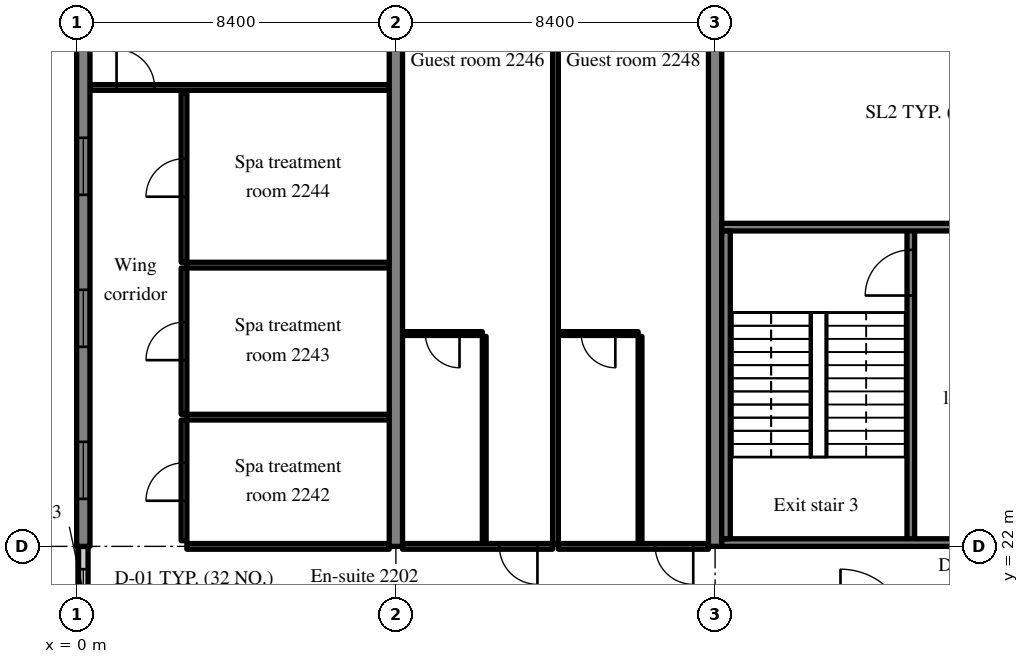
"""IFC4 building model, lengths in metres.
Left out: names, types, materials, properties, quantities, classifications, styles, units other than length and angle.
Written with IfcOpenShell. Run it as: python <this file> out.ifc"""

import sys

from ifc_helpers import new_model, si_unit, direction, frame, frame_2d, origin, place, context, subcontext, project, spatial, rectangle, extrude, source, transform, mapped, element, fill, save


model = new_model("IFC4")
c1 = context("Model", 3, precision=1e-05, world=origin(), true_north=direction((0.0, 1.0)))
c2 = subcontext(c1, "Body", "Model", "MODEL_VIEW")
j1 = project(units=[si_unit("LENGTHUNIT", "METRE"), si_unit("PLANEANGLEUNIT", "RADIAN")], contexts=[c1])
p1 = place(None, origin())
s1 = spatial("IfcSite", under=j1, at=p1, CompositionType="ELEMENT")
p2 = place(p1, origin())
s2 = spatial("IfcBuilding", under=s1, at=p2, CompositionType="ELEMENT")
p3 = place(p2, frame((0.0, 0.0, 95.2)))
s3 = spatial("IfcBuildingStorey", under=s2, at=p3, CompositionType="ELEMENT", Elevation=95.2)
m1 = source(origin(), c2, "Body", "SweptSolid", [
    extrude(rectangle(XDim=16.0, YDim=0.35, at=frame_2d((8.0, 0.0))), origin(), (0.0, 0.0, 1.0), 3.52),
])
p4 = place(p3, frame((0.175, 22.0, 0.0), z_axis=(0.0, 0.0, 1.0), x_axis=(0.0, 1.0, 0.0)))
e1 = element("IfcWall", 1, at=p4, inside=s3, PredefinedType="SHEAR", context=c2, shape_type="MappedRepresentation", body=[
    mapped(m1, transform((0.0, 0.0, 0.0), scale=1.0)),
])
m2 = source(origin(), c2, "Body", "SweptSolid", [
    extrude(rectangle(XDim=1.5, YDim=1.5, at=frame_2d((0.75, 0.75))), frame((0.0, 0.185, 0.0), z_axis=(0.0, -1.0, 0.0), x_axis=(1.0, 0.0, 0.0)), (0.0, 0.0, 1.0), 0.37),
])
p5 = place(p4, frame((1.25, 0.0, 0.9)))
e2 = element("IfcOpeningElement", 2, at=p5, cuts=e1, PredefinedType="OPENING", context=c2, shape_type="MappedRepresentation", body=[
    mapped(m2, transform((0.0, 0.0, 0.0), scale=1.0)),
])
p6 = place(p4, frame((5.25, 0.0, 0.9)))
e3 = element("IfcOpeningElement", 3, at=p6, cuts=e1, PredefinedType="OPENING", context=c2, shape_type="MappedRepresentation", body=[
    mapped(m2, transform((0.0, 0.0, 0.0), scale=1.0)),
])
p7 = place(p4, frame((9.25, 0.0, 0.9)))
e4 = element("IfcOpeningElement", 4, at=p7, cuts=e1, PredefinedType="OPENING", context=c2, shape_type="MappedRepresentation", body=[
    mapped(m2, transform((0.0, 0.0, 0.0), scale=1.0)),
])
p8 = place(p4, frame((13.25, 0.0, 0.9)))
e5 = element("IfcOpeningElement", 5, at=p8, cuts=e1, PredefinedType="OPENING", context=c2, shape_type="MappedRepresentation", body=[
    mapped(m2, transform((0.0, 0.0, 0.0), scale=1.0)),
])
m3 = source(origin(), c2, "Body", "SweptSolid", [
    extrude(rectangle(XDim=20.0, YDim=0.35, at=frame_2d((10.0, 0.0))), origin(), (0.0, 0.0, 1.0), 3.52),
])
for number, where, z_axis, x_axis in (
    (6, (8.4, 22.0, 0.0), (0.0, 0.0, 1.0), (0.0, 1.0, 0.0)),
    (7, (16.8, 22.0, 0.0), (0.0, 0.0, 1.0), (0.0, 1.0, 0.0)),
):
    element("IfcWall", number, at=place(p3, frame(where, z_axis=z_axis, x_axis=x_axis)), inside=s3, PredefinedType="SHEAR", context=c2, shape_type="MappedRepresentation", body=[
        mapped(m3, transform((0.0, 0.0, 0.0), scale=1.0)),
    ])
m4 = source(origin(), c2, "Body", "SweptSolid", [
    extrude(rectangle(XDim=2.4, YDim=0.25, at=frame_2d((1.2, 0.0))), origin(), (0.0, 0.0, 1.0), 2.62),
])
p9 = place(p3, frame((0.175, 19.6, 0.0), z_axis=(0.0, 0.0, 1.0), x_axis=(0.0, 1.0, 0.0)))
e8 = element("IfcWall", 8, at=p9, inside=s3, PredefinedType="SOLIDWALL", context=c2, shape_type="MappedRepresentation", body=[
    mapped(m4, transform((0.0, 0.0, 0.0), scale=1.0)),
])
m5 = source(origin(), c2, "Body", "SweptSolid", [
    extrude(rectangle(XDim=1.2, YDim=1.5, at=frame_2d((0.6, 0.75))), frame((0.0, 0.135, 0.0), z_axis=(0.0, -1.0, 0.0), x_axis=(1.0, 0.0, 0.0)), (0.0, 0.0, 1.0), 0.27),
])
p10 = place(p9, frame((0.6, 0.0, 0.9)))
e9 = element("IfcOpeningElement", 9, at=p10, cuts=e8, PredefinedType="OPENING", context=c2, shape_type="MappedRepresentation", body=[
    mapped(m5, transform((0.0, 0.0, 0.0), scale=1.0)),
])
m6 = source(origin(), c2, "Body", "SweptSolid", [
    extrude(rectangle(XDim=8.3, YDim=0.2, at=frame_2d((4.15, 0.0))), origin(), (0.0, 0.0, 1.0), 3.52),
])
p11 = place(p3, frame((21.95, 22.1, 0.0), z_axis=(0.0, 0.0, 1.0), x_axis=(0.0, 1.0, 0.0)))
e10 = element("IfcWall", 10, at=p11, inside=s3, PredefinedType="SOLIDWALL", context=c2, shape_type="MappedRepresentation", body=[
    mapped(m6, transform((0.0, 0.0, 0.0), scale=1.0)),
])
m7 = source(origin(), c2, "Body", "SweptSolid", [
    extrude(rectangle(XDim=1.2, YDim=2.1, at=frame_2d((0.6, 1.05))), frame((0.0, 0.11, 0.0), z_axis=(0.0, -1.0, 0.0), x_axis=(1.0, 0.0, 0.0)), (0.0, 0.0, 1.0), 0.22),
])
p12 = place(p11, frame((6.5, 0.0, 0.0)))
e11 = element("IfcOpeningElement", 11, at=p12, cuts=e10, PredefinedType="OPENING", context=c2, shape_type="MappedRepresentation", body=[
    mapped(m7, transform((0.0, 0.0, 0.0), scale=1.0)),
])
m8 = source(origin(), c2, "Body", "SweptSolid", [
    extrude(rectangle(XDim=8.225, YDim=0.2, at=frame_2d((4.112, 0.0))), origin(), (0.0, 0.0, 1.0), 3.52),
])
p13 = place(p3, frame((16.975, 22.1, 0.0), z_axis=(0.0, 0.0, 1.0), x_axis=(1.0, 0.0, 0.0)))
e12 = element("IfcWall", 12, at=p13, inside=s3, PredefinedType="SOLIDWALL", context=c2, shape_type="MappedRepresentation", body=[
    mapped(m8, transform((0.0, 0.0, 0.0), scale=1.0)),
])
p14 = place(p13, frame((6.025, 0.0, 0.0)))
e13 = element("IfcOpeningElement", 13, at=p14, cuts=e12, PredefinedType="OPENING", context=c2, shape_type="MappedRepresentation", body=[
    mapped(m7, transform((0.0, 0.0, 0.0), scale=1.0)),
])
p15 = place(p3, frame((16.975, 30.4, 0.0), z_axis=(0.0, 0.0, 1.0), x_axis=(1.0, 0.0, 0.0)))
e14 = element("IfcWall", 14, at=p15, inside=s3, PredefinedType="SOLIDWALL", context=c2, shape_type="MappedRepresentation", body=[
    mapped(m8, transform((0.0, 0.0, 0.0), scale=1.0)),
])
m9 = source(origin(), c2, "Body", "SweptSolid", [
    extrude(rectangle(XDim=1.0, YDim=2.1, at=frame_2d((0.5, 1.05))), frame((0.0, 0.11, 0.0), z_axis=(0.0, -1.0, 0.0), x_axis=(1.0, 0.0, 0.0)), (0.0, 0.0, 1.0), 0.22),
])
p16 = place(p15, frame((6.125, 0.0, 0.0)))
e15 = element("IfcOpeningElement", 15, at=p16, cuts=e14, PredefinedType="OPENING", context=c2, shape_type="MappedRepresentation", body=[
    mapped(m9, transform((0.0, 0.0, 0.0), scale=1.0)),
])
m10 = source(origin(), c2, "Body", "SweptSolid", [
    extrude(rectangle(XDim=8.1, YDim=0.225, at=frame_2d((4.05, 0.0))), origin(), (0.0, 0.0, 1.0), 3.52),
])
p17 = place(p3, frame((17.087, 22.2, 0.0), z_axis=(0.0, 0.0, 1.0), x_axis=(0.0, 1.0, 0.0)))
e16 = element("IfcWall", 16, at=p17, inside=s3, PredefinedType="SOLIDWALL", context=c2, shape_type="MappedRepresentation", body=[
    mapped(m10, transform((0.0, 0.0, 0.0), scale=1.0)),
])
m11 = source(origin(), c2, "Body", "SweptSolid", [
    extrude(rectangle(XDim=5.325, YDim=0.15, at=frame_2d((2.663, 0.0))), origin(), (0.0, 0.0, 1.0), 2.82),
])
p18 = place(p3, frame((2.9, 22.0, 0.0), z_axis=(0.0, 0.0, 1.0), x_axis=(1.0, 0.0, 0.0)))
e17 = element("IfcWall", 17, at=p18, inside=s3, PredefinedType="PARTITIONING", context=c2, shape_type="MappedRepresentation", body=[
    mapped(m11, transform((0.0, 0.0, 0.0), scale=1.0)),
])
m12 = source(origin(), c2, "Body", "SweptSolid", [
    extrude(rectangle(XDim=3.175, YDim=0.15, at=frame_2d((1.587, 0.0))), origin(), (0.0, 0.0, 1.0), 3.52),
])
p19 = place(p3, frame((2.825, 22.15, 0.0), z_axis=(0.0, 0.0, 1.0), x_axis=(0.0, 1.0, 0.0)))
e18 = element("IfcWall", 18, at=p19, inside=s3, PredefinedType="PARTITIONING", context=c2, shape_type="MappedRepresentation", body=[
    mapped(m12, transform((0.0, 0.0, 0.0), scale=1.0)),
])
m13 = source(origin(), c2, "Body", "SweptSolid", [
    extrude(rectangle(XDim=1.0, YDim=2.1, at=frame_2d((0.5, 1.05))), frame((0.0, 0.085, 0.0), z_axis=(0.0, -1.0, 0.0), x_axis=(1.0, 0.0, 0.0)), (0.0, 0.0, 1.0), 0.17),
])
p20 = place(p19, frame((1.05, 0.0, 0.0)))
e19 = element("IfcOpeningElement", 19, at=p20, cuts=e18, PredefinedType="OPENING", context=c2, shape_type="MappedRepresentation", body=[
    mapped(m13, transform((0.0, 0.0, 0.0), scale=1.0)),
])
m14 = source(origin(), c2, "Body", "SweptSolid", [
    extrude(rectangle(XDim=5.325, YDim=0.15, at=frame_2d((2.663, 0.0))), origin(), (0.0, 0.0, 1.0), 3.52),
])
p21 = place(p3, frame((2.9, 25.4, 0.0), z_axis=(0.0, 0.0, 1.0), x_axis=(1.0, 0.0, 0.0)))
e20 = element("IfcWall", 20, at=p21, inside=s3, PredefinedType="PARTITIONING", context=c2, shape_type="MappedRepresentation", body=[
    mapped(m14, transform((0.0, 0.0, 0.0), scale=1.0)),
])
m15 = source(origin(), c2, "Body", "SweptSolid", [
    extrude(rectangle(XDim=3.85, YDim=0.15, at=frame_2d((1.925, 0.0))), origin(), (0.0, 0.0, 1.0), 3.52),
])
p22 = place(p3, frame((2.825, 25.475, 0.0), z_axis=(0.0, 0.0, 1.0), x_axis=(0.0, 1.0, 0.0)))
e21 = element("IfcWall", 21, at=p22, inside=s3, PredefinedType="PARTITIONING", context=c2, shape_type="MappedRepresentation", body=[
    mapped(m15, transform((0.0, 0.0, 0.0), scale=1.0)),
])
p23 = place(p22, frame((1.425, 0.0, 0.0)))
e22 = element("IfcOpeningElement", 22, at=p23, cuts=e21, PredefinedType="OPENING", context=c2, shape_type="MappedRepresentation", body=[
    mapped(m13, transform((0.0, 0.0, 0.0), scale=1.0)),
])
p24 = place(p3, frame((2.9, 29.4, 0.0), z_axis=(0.0, 0.0, 1.0), x_axis=(1.0, 0.0, 0.0)))
e23 = element("IfcWall", 23, at=p24, inside=s3, PredefinedType="PARTITIONING", context=c2, shape_type="MappedRepresentation", body=[
    mapped(m14, transform((0.0, 0.0, 0.0), scale=1.0)),
])
m16 = source(origin(), c2, "Body", "SweptSolid", [
    extrude(rectangle(XDim=4.45, YDim=0.15, at=frame_2d((2.225, 0.0))), origin(), (0.0, 0.0, 1.0), 3.52),
])
p25 = place(p3, frame((2.825, 29.475, 0.0), z_axis=(0.0, 0.0, 1.0), x_axis=(0.0, 1.0, 0.0)))
e24 = element("IfcWall", 24, at=p25, inside=s3, PredefinedType="PARTITIONING", context=c2, shape_type="MappedRepresentation", body=[
    mapped(m16, transform((0.0, 0.0, 0.0), scale=1.0)),
])
p26 = place(p25, frame((1.725, 0.0, 0.0)))
e25 = element("IfcOpeningElement", 25, at=p26, cuts=e24, PredefinedType="OPENING", context=c2, shape_type="MappedRepresentation", body=[
    mapped(m13, transform((0.0, 0.0, 0.0), scale=1.0)),
])
m17 = source(origin(), c2, "Body", "SweptSolid", [
    extrude(rectangle(XDim=7.875, YDim=0.15, at=frame_2d((3.938, 0.0))), origin(), (0.0, 0.0, 1.0), 3.52),
])
p27 = place(p3, frame((0.35, 34.075, 0.0), z_axis=(0.0, 0.0, 1.0), x_axis=(1.0, 0.0, 0.0)))
e26 = element("IfcWall", 26, at=p27, inside=s3, PredefinedType="PARTITIONING", context=c2, shape_type="MappedRepresentation", body=[
    mapped(m17, transform((0.0, 0.0, 0.0), scale=1.0)),
])
p28 = place(p27, frame((0.7, 0.0, 0.0)))
e27 = element("IfcOpeningElement", 27, at=p28, cuts=e26, PredefinedType="OPENING", context=c2, shape_type="MappedRepresentation", body=[
    mapped(m13, transform((0.0, 0.0, 0.0), scale=1.0)),
])
m18 = source(origin(), c2, "Body", "SweptSolid", [
    extrude(rectangle(XDim=5.45, YDim=0.1, at=frame_2d((2.725, 0.0))), origin(), (0.0, 0.0, 1.0), 3.52),
])
p29 = place(p3, frame((10.725, 22.075, 0.0), z_axis=(0.0, 0.0, 1.0), x_axis=(0.0, 1.0, 0.0)))
e28 = element("IfcWall", 28, at=p29, inside=s3, PredefinedType="PARTITIONING", context=c2, shape_type="MappedRepresentation", body=[
    mapped(m18, transform((0.0, 0.0, 0.0), scale=1.0)),
])
m19 = source(origin(), c2, "Body", "SweptSolid", [
    extrude(rectangle(XDim=2.1, YDim=0.1, at=frame_2d((1.05, 0.0))), origin(), (0.0, 0.0, 1.0), 3.52),
])
p30 = place(p3, frame((8.575, 27.6, 0.0), z_axis=(0.0, 0.0, 1.0), x_axis=(1.0, 0.0, 0.0)))
e29 = element("IfcWall", 29, at=p30, inside=s3, PredefinedType="PARTITIONING", context=c2, shape_type="MappedRepresentation", body=[
    mapped(m19, transform((0.0, 0.0, 0.0), scale=1.0)),
])
m20 = source(origin(), c2, "Body", "SweptSolid", [
    extrude(rectangle(XDim=0.9, YDim=2.1, at=frame_2d((0.45, 1.05))), frame((0.0, 0.06, 0.0), z_axis=(0.0, -1.0, 0.0), x_axis=(1.0, 0.0, 0.0)), (0.0, 0.0, 1.0), 0.12),
])
p31 = place(p30, frame((0.6, 0.0, 0.0)))
e30 = element("IfcOpeningElement", 30, at=p31, cuts=e29, PredefinedType="OPENING", context=c2, shape_type="MappedRepresentation", body=[
    mapped(m20, transform((0.0, 0.0, 0.0), scale=1.0)),
])
m21 = source(origin(), c2, "Body", "SweptSolid", [
    extrude(rectangle(XDim=3.95, YDim=0.15, at=frame_2d((1.975, 0.0))), origin(), (0.0, 0.0, 1.0), 2.82),
])
p32 = place(p3, frame((8.575, 22.0, 0.0), z_axis=(0.0, 0.0, 1.0), x_axis=(1.0, 0.0, 0.0)))
e31 = element("IfcWall", 31, at=p32, inside=s3, PredefinedType="PARTITIONING", context=c2, shape_type="MappedRepresentation", body=[
    mapped(m21, transform((0.0, 0.0, 0.0), scale=1.0)),
])
p33 = place(p32, frame((2.55, 0.0, 0.0)))
e32 = element("IfcOpeningElement", 32, at=p33, cuts=e31, PredefinedType="OPENING", context=c2, shape_type="MappedRepresentation", body=[
    mapped(m13, transform((0.0, 0.0, 0.0), scale=1.0)),
])
p34 = place(p3, frame((14.825, 22.075, 0.0), z_axis=(0.0, 0.0, 1.0), x_axis=(0.0, 1.0, 0.0)))
e33 = element("IfcWall", 33, at=p34, inside=s3, PredefinedType="PARTITIONING", context=c2, shape_type="MappedRepresentation", body=[
    mapped(m18, transform((0.0, 0.0, 0.0), scale=1.0)),
])
m22 = source(origin(), c2, "Body", "SweptSolid", [
    extrude(rectangle(XDim=2.1, YDim=0.1, at=frame_2d((1.05, 0.0))), origin(), (0.0, 0.0, 1.0), 3.52),
])
p35 = place(p3, frame((12.675, 27.6, 0.0), z_axis=(0.0, 0.0, 1.0), x_axis=(1.0, 0.0, 0.0)))
e34 = element("IfcWall", 34, at=p35, inside=s3, PredefinedType="PARTITIONING", context=c2, shape_type="MappedRepresentation", body=[
    mapped(m22, transform((0.0, 0.0, 0.0), scale=1.0)),
])
p36 = place(p35, frame((0.6, 0.0, 0.0)))
e35 = element("IfcOpeningElement", 35, at=p36, cuts=e34, PredefinedType="OPENING", context=c2, shape_type="MappedRepresentation", body=[
    mapped(m20, transform((0.0, 0.0, 0.0), scale=1.0)),
])
p37 = place(p3, frame((12.675, 22.0, 0.0), z_axis=(0.0, 0.0, 1.0), x_axis=(1.0, 0.0, 0.0)))
e36 = element("IfcWall", 36, at=p37, inside=s3, PredefinedType="PARTITIONING", context=c2, shape_type="MappedRepresentation", body=[
    mapped(m21, transform((0.0, 0.0, 0.0), scale=1.0)),
])
p38 = place(p37, frame((2.55, 0.0, 0.0)))
e37 = element("IfcOpeningElement", 37, at=p38, cuts=e36, PredefinedType="OPENING", context=c2, shape_type="MappedRepresentation", body=[
    mapped(m13, transform((0.0, 0.0, 0.0), scale=1.0)),
])
m23 = source(origin(), c2, "Body", "SweptSolid", [
    extrude(rectangle(XDim=19.225, YDim=0.15, at=frame_2d((9.613, 0.0))), origin(), (0.0, 0.0, 1.0), 3.52),
])
p39 = place(p3, frame((12.6, 22.075, 0.0), z_axis=(0.0, 0.0, 1.0), x_axis=(0.0, 1.0, 0.0)))
e38 = element("IfcWall", 38, at=p39, inside=s3, PredefinedType="PARTITIONING", context=c2, shape_type="MappedRepresentation", body=[
    mapped(m23, transform((0.0, 0.0, 0.0), scale=1.0)),
])
m24 = source(origin(), c2, "Body", "SweptSolid", [
    extrude(rectangle(XDim=1.5, YDim=1.5, at=frame_2d((0.75, 0.75))), frame((0.0, 0.03, 0.0), z_axis=(0.0, -1.0, 0.0), x_axis=(1.0, 0.0, 0.0)), (0.0, 0.0, 1.0), 0.06),
])
p40 = place(p5, origin())
e39 = element("IfcWindow", 39, at=p40, inside=s3, PartitioningType="SINGLE_PANEL", PredefinedType="WINDOW", context=c2, shape_type="MappedRepresentation", body=[
    mapped(m24, transform((0.0, 0.0, 0.0), scale=1.0)),
])
fill(e2, e39)
p41 = place(p6, origin())
e40 = element("IfcWindow", 40, at=p41, inside=s3, PartitioningType="SINGLE_PANEL", PredefinedType="WINDOW", context=c2, shape_type="MappedRepresentation", body=[
    mapped(m24, transform((0.0, 0.0, 0.0), scale=1.0)),
])
fill(e3, e40)
p42 = place(p7, origin())
e41 = element("IfcWindow", 41, at=p42, inside=s3, PartitioningType="SINGLE_PANEL", PredefinedType="WINDOW", context=c2, shape_type="MappedRepresentation", body=[
    mapped(m24, transform((0.0, 0.0, 0.0), scale=1.0)),
])
fill(e4, e41)
m25 = source(origin(), c2, "Body", "SweptSolid", [
    extrude(rectangle(XDim=1.2, YDim=1.5, at=frame_2d((0.6, 0.75))), frame((0.0, 0.03, 0.0), z_axis=(0.0, -1.0, 0.0), x_axis=(1.0, 0.0, 0.0)), (0.0, 0.0, 1.0), 0.06),
])
p43 = place(p10, origin())
e42 = element("IfcWindow", 42, at=p43, inside=s3, PartitioningType="SINGLE_PANEL", PredefinedType="WINDOW", context=c2, shape_type="MappedRepresentation", body=[
    mapped(m25, transform((0.0, 0.0, 0.0), scale=1.0)),
])
fill(e9, e42)
m26 = source(origin(), c2, "Body", "SweptSolid", [
    extrude(rectangle(XDim=1.2, YDim=2.1, at=frame_2d((0.6, 1.05))), frame((0.0, 0.025, 0.0), z_axis=(0.0, -1.0, 0.0), x_axis=(1.0, 0.0, 0.0)), (0.0, 0.0, 1.0), 0.05),
])
p44 = place(p12, origin())
e43 = element("IfcDoor", 43, at=p44, inside=s3, OperationType="SINGLE_SWING_LEFT", PredefinedType="DOOR", context=c2, shape_type="MappedRepresentation", body=[
    mapped(m26, transform((0.0, 0.0, 0.0), scale=1.0)),
])
fill(e11, e43)
m27 = source(origin(), c2, "Body", "SweptSolid", [
    extrude(rectangle(XDim=1.0, YDim=2.1, at=frame_2d((0.5, 1.05))), frame((0.0, 0.025, 0.0), z_axis=(0.0, -1.0, 0.0), x_axis=(1.0, 0.0, 0.0)), (0.0, 0.0, 1.0), 0.05),
])
p45 = place(p20, origin())
e44 = element("IfcDoor", 44, at=p45, inside=s3, OperationType="SINGLE_SWING_LEFT", PredefinedType="DOOR", context=c2, shape_type="MappedRepresentation", body=[
    mapped(m27, transform((0.0, 0.0, 0.0), scale=1.0)),
])
fill(e19, e44)
p46 = place(p23, origin())
e45 = element("IfcDoor", 45, at=p46, inside=s3, OperationType="SINGLE_SWING_LEFT", PredefinedType="DOOR", context=c2, shape_type="MappedRepresentation", body=[
    mapped(m27, transform((0.0, 0.0, 0.0), scale=1.0)),
])
fill(e22, e45)
p47 = place(p26, origin())
e46 = element("IfcDoor", 46, at=p47, inside=s3, OperationType="SINGLE_SWING_LEFT", PredefinedType="DOOR", context=c2, shape_type="MappedRepresentation", body=[
    mapped(m27, transform((0.0, 0.0, 0.0), scale=1.0)),
])
fill(e25, e46)
p48 = place(p28, origin())
e47 = element("IfcDoor", 47, at=p48, inside=s3, OperationType="SINGLE_SWING_LEFT", PredefinedType="DOOR", context=c2, shape_type="MappedRepresentation", body=[
    mapped(m27, transform((0.0, 0.0, 0.0), scale=1.0)),
])
fill(e27, e47)
m28 = source(origin(), c2, "Body", "SweptSolid", [
    extrude(rectangle(XDim=0.9, YDim=2.1, at=frame_2d((0.45, 1.05))), frame((0.0, 0.025, 0.0), z_axis=(0.0, -1.0, 0.0), x_axis=(1.0, 0.0, 0.0)), (0.0, 0.0, 1.0), 0.05),
])
p49 = place(p31, origin())
e48 = element("IfcDoor", 48, at=p49, inside=s3, OperationType="SINGLE_SWING_RIGHT", PredefinedType="DOOR", context=c2, shape_type="MappedRepresentation", body=[
    mapped(m28, transform((0.0, 0.0, 0.0), scale=1.0)),
])
fill(e30, e48)
p50 = place(p33, origin())
e49 = element("IfcDoor", 49, at=p50, inside=s3, OperationType="SINGLE_SWING_RIGHT", PredefinedType="DOOR", context=c2, shape_type="MappedRepresentation", body=[
    mapped(m27, transform((0.0, 0.0, 0.0), scale=1.0)),
])
fill(e32, e49)
p51 = place(p36, origin())
e50 = element("IfcDoor", 50, at=p51, inside=s3, OperationType="SINGLE_SWING_RIGHT", PredefinedType="DOOR", context=c2, shape_type="MappedRepresentation", body=[
    mapped(m28, transform((0.0, 0.0, 0.0), scale=1.0)),
])
fill(e35, e50)
p52 = place(p38, origin())
e51 = element("IfcDoor", 51, at=p52, inside=s3, OperationType="SINGLE_SWING_RIGHT", PredefinedType="DOOR", context=c2, shape_type="MappedRepresentation", body=[
    mapped(m27, transform((0.0, 0.0, 0.0), scale=1.0)),
])
fill(e37, e51)
save(model, sys.argv[1])
